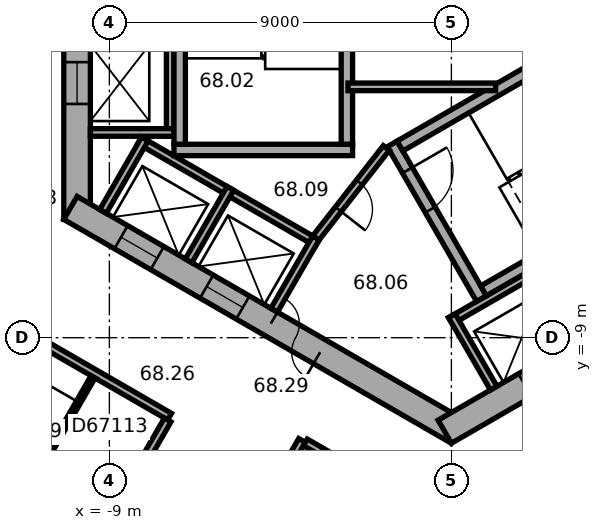
"""IFC4 building model, lengths in metres.
Left out: names, types, materials, properties, quantities, classifications, styles, units other than length and angle.
Written with IfcOpenShell. Run it as: python <this file> out.ifc"""

import sys

from ifc_helpers import new_model, si_unit, direction, frame, frame_2d, origin, place, context, subcontext, project, spatial, rectangle, extrude, element, fill, save


model = new_model("IFC4")
c1 = context("Model", 3, precision=1e-05, world=origin(), true_north=direction((0.0, 1.0)))
c2 = subcontext(c1, "Body", "Model", "MODEL_VIEW")
j1 = project(units=[si_unit("LENGTHUNIT", "METRE"), si_unit("PLANEANGLEUNIT", "RADIAN")], contexts=[c1])
p1 = place(None, origin())
s1 = spatial("IfcSite", under=j1, at=p1, CompositionType="ELEMENT")
p2 = place(p1, origin())
s2 = spatial("IfcBuilding", under=s1, at=p2, CompositionType="ELEMENT")
p3 = place(p2, frame((0.0, 0.0, 274.6)))
s3 = spatial("IfcBuildingStorey", under=s2, at=p3, CompositionType="ELEMENT", Elevation=274.6)
p4 = place(p3, frame((-9.85, 5.889, 0.0), z_axis=(0.0, 0.0, 1.0), x_axis=(0.0, -1.0, 0.0)))
e1 = element("IfcWall", 1, at=p4, inside=s3, PredefinedType="SHEAR", context=c2, shape_type="SweptSolid", body=[
    extrude(rectangle(XDim=11.778, YDim=0.7, at=frame_2d((5.889, 0.0))), origin(), (0.0, 0.0, 1.0), 3.7),
])
p5 = place(p4, frame((5.039, 0.0, 0.0)))
e2 = element("IfcOpeningElement", 2, at=p5, cuts=e1, PredefinedType="OPENING", context=c2, shape_type="SweptSolid", body=[
    extrude(rectangle(XDim=1.1, YDim=2.1, at=frame_2d((0.55, 1.05))), frame((0.0, 0.36, 0.0), z_axis=(0.0, -1.0, 0.0), x_axis=(1.0, 0.0, 0.0)), (0.0, 0.0, 1.0), 0.72),
])
p6 = place(p4, frame((7.639, 0.0, 0.0)))
e3 = element("IfcOpeningElement", 3, at=p6, cuts=e1, PredefinedType="OPENING", context=c2, shape_type="SweptSolid", body=[
    extrude(rectangle(XDim=1.1, YDim=2.1, at=frame_2d((0.55, 1.05))), frame((0.0, 0.36, 0.0), z_axis=(0.0, -1.0, 0.0), x_axis=(1.0, 0.0, 0.0)), (0.0, 0.0, 1.0), 0.72),
])
p7 = place(p3, frame((-10.025, -5.586, 0.0), z_axis=(0.0, 0.0, 1.0), x_axis=(0.866026453023, -0.499998182661, 0.0)))
e4 = element("IfcWall", 4, at=p7, inside=s3, PredefinedType="SHEAR", context=c2, shape_type="SweptSolid", body=[
    extrude(rectangle(XDim=11.778, YDim=0.7, at=frame_2d((5.889, 0.0))), origin(), (0.0, 0.0, 1.0), 3.7),
])
p8 = place(p7, frame((6.089, 0.0, 0.0)))
e5 = element("IfcOpeningElement", 5, at=p8, cuts=e4, PredefinedType="OPENING", context=c2, shape_type="SweptSolid", body=[
    extrude(rectangle(XDim=1.5, YDim=2.1, at=frame_2d((0.75, 1.05))), frame((0.0, 0.36, 0.0), z_axis=(0.0, -1.0, 0.0), x_axis=(1.0, 0.0, 0.0)), (0.0, 0.0, 1.0), 0.72),
])
p9 = place(p7, frame((1.539, 0.0, 0.0)))
e6 = element("IfcOpeningElement", 6, at=p9, cuts=e4, PredefinedType="OPENING", context=c2, shape_type="SweptSolid", body=[
    extrude(rectangle(XDim=1.1, YDim=2.1, at=frame_2d((0.55, 1.05))), frame((0.0, 0.36, 0.0), z_axis=(0.0, -1.0, 0.0), x_axis=(1.0, 0.0, 0.0)), (0.0, 0.0, 1.0), 0.72),
])
p10 = place(p7, frame((4.139, 0.0, 0.0)))
e7 = element("IfcOpeningElement", 7, at=p10, cuts=e4, PredefinedType="OPENING", context=c2, shape_type="SweptSolid", body=[
    extrude(rectangle(XDim=1.1, YDim=2.1, at=frame_2d((0.55, 1.05))), frame((0.0, 0.36, 0.0), z_axis=(0.0, -1.0, 0.0), x_axis=(1.0, 0.0, 0.0)), (0.0, 0.0, 1.0), 0.72),
])
p11 = place(p3, frame((-0.175, -11.475, 0.0), z_axis=(0.0, 0.0, 1.0), x_axis=(0.866026453023, 0.499998182661, 0.0)))
e8 = element("IfcWall", 8, at=p11, inside=s3, PredefinedType="SHEAR", context=c2, shape_type="SweptSolid", body=[
    extrude(rectangle(XDim=11.778, YDim=0.7, at=frame_2d((5.889, 0.0))), origin(), (0.0, 0.0, 1.0), 3.7),
])
p12 = place(p11, frame((2.439, 0.0, 0.0)))
e9 = element("IfcOpeningElement", 9, at=p12, cuts=e8, PredefinedType="OPENING", context=c2, shape_type="SweptSolid", body=[
    extrude(rectangle(XDim=1.1, YDim=2.1, at=frame_2d((0.55, 1.05))), frame((0.0, 0.36, 0.0), z_axis=(0.0, -1.0, 0.0), x_axis=(1.0, 0.0, 0.0)), (0.0, 0.0, 1.0), 0.72),
])
p13 = place(p11, frame((5.039, 0.0, 0.0)))
e10 = element("IfcOpeningElement", 10, at=p13, cuts=e8, PredefinedType="OPENING", context=c2, shape_type="SweptSolid", body=[
    extrude(rectangle(XDim=1.1, YDim=2.1, at=frame_2d((0.55, 1.05))), frame((0.0, 0.36, 0.0), z_axis=(0.0, -1.0, 0.0), x_axis=(1.0, 0.0, 0.0)), (0.0, 0.0, 1.0), 0.72),
])
p14 = place(p11, frame((7.639, 0.0, 0.0)))
e11 = element("IfcOpeningElement", 11, at=p14, cuts=e8, PredefinedType="OPENING", context=c2, shape_type="SweptSolid", body=[
    extrude(rectangle(XDim=1.1, YDim=2.1, at=frame_2d((0.55, 1.05))), frame((0.0, 0.36, 0.0), z_axis=(0.0, -1.0, 0.0), x_axis=(1.0, 0.0, 0.0)), (0.0, 0.0, 1.0), 0.72),
])
p15 = place(p3, frame((-7.4, 4.3, 0.0), z_axis=(0.0, 0.0, 1.0), x_axis=(0.0, -1.0, 0.0)))
e12 = element("IfcWall", 12, at=p15, inside=s3, PredefinedType="PARTITIONING", context=c2, shape_type="SweptSolid", body=[
    extrude(rectangle(XDim=8.0, YDim=0.2, at=frame_2d((4.0, 0.0))), origin(), (0.0, 0.0, 1.0), 3.35),
])
p16 = place(p3, frame((-7.3, -3.6, 0.0), z_axis=(0.0, 0.0, 1.0), x_axis=(-1.0, 0.0, 0.0)))
e13 = element("IfcWall", 13, at=p16, inside=s3, PredefinedType="PARTITIONING", context=c2, shape_type="SweptSolid", body=[
    extrude(rectangle(XDim=2.2, YDim=0.2, at=frame_2d((1.1, 0.0))), origin(), (0.0, 0.0, 1.0), 3.35),
])
p17 = place(p3, frame((-8.203, -3.809, 0.0), z_axis=(0.0, 0.0, 1.0), x_axis=(0.866028230842, -0.499995103361, 0.0)))
e14 = element("IfcWall", 14, at=p17, inside=s3, PredefinedType="PARTITIONING", context=c2, shape_type="SweptSolid", body=[
    extrude(rectangle(XDim=5.4, YDim=0.2, at=frame_2d((2.7, 0.0))), origin(), (0.0, 0.0, 1.0), 3.35),
])
for number, where, z_axis, x_axis in (
    (15, (-8.067, -3.772, 0.0), (0.0, 0.0, 1.0), (-0.5, -0.866, 0.0)),
    (16, (-5.815, -5.072, 0.0), (0.0, 0.0, 1.0), (-0.5, -0.866, 0.0)),
):
    element("IfcWall", number, at=place(p3, frame(where, z_axis=z_axis, x_axis=x_axis)), inside=s3, PredefinedType="PARTITIONING", context=c2, shape_type="SweptSolid", body=[
        extrude(rectangle(XDim=2.2, YDim=0.2, at=frame_2d((1.1, 0.0))), origin(), (0.0, 0.0, 1.0), 3.35),
    ])
p18 = place(p3, frame((-3.563, -6.372, 0.0), z_axis=(0.0, 0.0, 1.0), x_axis=(-0.499994660107, -0.866028486751, 0.0)))
e17 = element("IfcWall", 17, at=p18, inside=s3, PredefinedType="PARTITIONING", context=c2, shape_type="SweptSolid", body=[
    extrude(rectangle(XDim=2.2, YDim=0.2, at=frame_2d((1.1, 0.0))), origin(), (0.0, 0.0, 1.0), 3.35),
])
p19 = place(p3, frame((-0.024, -8.559, 0.0), z_axis=(0.0, 0.0, 1.0), x_axis=(0.866026010844, 0.49999894854, 0.0)))
e18 = element("IfcWall", 18, at=p19, inside=s3, PredefinedType="PARTITIONING", context=c2, shape_type="SweptSolid", body=[
    extrude(rectangle(XDim=8.0, YDim=0.2, at=frame_2d((4.0, 0.0))), origin(), (0.0, 0.0, 1.0), 3.35),
])
p20 = place(p3, frame((0.013, -8.422, 0.0), z_axis=(0.0, 0.0, 1.0), x_axis=(0.500077893725, -0.86598042715, 0.0)))
e19 = element("IfcWall", 19, at=p20, inside=s3, PredefinedType="PARTITIONING", context=c2, shape_type="SweptSolid", body=[
    extrude(rectangle(XDim=2.2, YDim=0.2, at=frame_2d((1.1, 0.0))), origin(), (0.0, 0.0, 1.0), 3.35),
])
p21 = place(p3, frame((-2.6, -4.06, 0.0), z_axis=(0.0, 0.0, 1.0), x_axis=(-1.0, 0.0, 0.0)))
e20 = element("IfcWall", 20, at=p21, inside=s3, PredefinedType="SHEAR", context=c2, shape_type="SweptSolid", body=[
    extrude(rectangle(XDim=4.7, YDim=0.3, at=frame_2d((2.35, 0.0))), origin(), (0.0, 0.0, 1.0), 3.35),
])
for number, where, z_axis, x_axis in (
    (21, (-2.75, 3.15, 0.0), (0.0, 0.0, 1.0), (0.0, -1.0, 0.0)),
    (22, (-7.15, 3.15, 0.0), (0.0, 0.0, 1.0), (0.0, -1.0, 0.0)),
):
    element("IfcWall", number, at=place(p3, frame(where, z_axis=z_axis, x_axis=x_axis)), inside=s3, PredefinedType="SHEAR", context=c2, shape_type="SweptSolid", body=[
        extrude(rectangle(XDim=7.06, YDim=0.3, at=frame_2d((3.53, 0.0))), origin(), (0.0, 0.0, 1.0), 3.35),
    ])
p22 = place(p3, frame((-1.558, -3.902, 0.0), z_axis=(0.0, 0.0, 1.0), x_axis=(0.499977259774, -0.866038532462, 0.0)))
e23 = element("IfcWall", 23, at=p22, inside=s3, PredefinedType="SHEAR", context=c2, shape_type="SweptSolid", body=[
    extrude(rectangle(XDim=4.7, YDim=0.3, at=frame_2d((2.35, 0.0))), origin(), (0.0, 0.0, 1.0), 3.35),
])
p23 = place(p22, frame((0.8, 0.0, 0.0)))
e24 = element("IfcOpeningElement", 24, at=p23, cuts=e23, PredefinedType="OPENING", context=c2, shape_type="SweptSolid", body=[
    extrude(rectangle(XDim=1.2, YDim=2.1, at=frame_2d((0.6, 1.05))), frame((0.0, 0.16, 0.0), z_axis=(0.0, -1.0, 0.0), x_axis=(1.0, 0.0, 0.0)), (0.0, 0.0, 1.0), 0.32),
])
for number, where, z_axis, x_axis in (
    (25, (-1.353, -3.957, 0.0), (0.0, 0.0, 1.0), (0.866, 0.5, 0.0)),
    (26, (0.847, -7.767, 0.0), (0.0, 0.0, 1.0), (0.866, 0.5, 0.0)),
):
    element("IfcWall", number, at=place(p3, frame(where, z_axis=z_axis, x_axis=x_axis)), inside=s3, PredefinedType="SHEAR", context=c2, shape_type="SweptSolid", body=[
        extrude(rectangle(XDim=7.06, YDim=0.3, at=frame_2d((3.53, 0.0))), origin(), (0.0, 0.0, 1.0), 3.35),
    ])
p24 = place(p3, frame((-1.712, -4.008, 0.0), z_axis=(0.0, 0.0, 1.0), x_axis=(-0.616549420702, -0.787316208287, 0.0)))
e27 = element("IfcWall", 27, at=p24, inside=s3, PredefinedType="PARTITIONING", context=c2, shape_type="SweptSolid", body=[
    extrude(rectangle(XDim=3.002, YDim=0.2, at=frame_2d((1.501, 0.0))), origin(), (0.0, 0.0, 1.0), 3.35),
])
p25 = place(p24, frame((1.15, 0.0, 0.0)))
e28 = element("IfcOpeningElement", 28, at=p25, cuts=e27, PredefinedType="OPENING", context=c2, shape_type="SweptSolid", body=[
    extrude(rectangle(XDim=0.9, YDim=2.1, at=frame_2d((0.45, 1.05))), frame((0.0, 0.11, 0.0), z_axis=(0.0, -1.0, 0.0), x_axis=(1.0, 0.0, 0.0)), (0.0, 0.0, 1.0), 0.22),
])
p26 = place(p3, frame((-2.72, -2.4, 0.0), z_axis=(0.0, 0.0, 1.0), x_axis=(1.0, 0.0, 0.0)))
e29 = element("IfcWall", 29, at=p26, inside=s3, PredefinedType="PARTITIONING", context=c2, shape_type="SweptSolid", body=[
    extrude(rectangle(XDim=3.883, YDim=0.2, at=frame_2d((1.941, 0.0))), origin(), (0.0, 0.0, 1.0), 3.35),
])
p27 = place(p3, frame((-11.285, -8.844, 0.0), z_axis=(0.0, 0.0, 1.0), x_axis=(0.866021785011, -0.500006267848, 0.0)))
e30 = element("IfcWall", 30, at=p27, inside=s3, PredefinedType="PARTITIONING", context=c2, shape_type="SweptSolid", body=[
    extrude(rectangle(XDim=4.468, YDim=0.2, at=frame_2d((2.234, 0.0))), origin(), (0.0, 0.0, 1.0), 3.35),
])
p28 = place(p3, frame((-9.99, -15.537, 0.0), z_axis=(0.0, 0.0, 1.0), x_axis=(0.499966611936, 0.866044679534, 0.0)))
e31 = element("IfcWall", 31, at=p28, inside=s3, PredefinedType="PARTITIONING", context=c2, shape_type="SweptSolid", body=[
    extrude(rectangle(XDim=5.049, YDim=0.2, at=frame_2d((2.524, 0.0))), origin(), (0.0, 0.0, 1.0), 2.65),
])
p29 = place(p28, frame((2.024, 0.0, 0.0)))
e32 = element("IfcOpeningElement", 32, at=p29, cuts=e31, PredefinedType="OPENING", context=c2, shape_type="SweptSolid", body=[
    extrude(rectangle(XDim=1.0, YDim=2.1, at=frame_2d((0.5, 1.05))), frame((0.0, 0.11, 0.0), z_axis=(0.0, -1.0, 0.0), x_axis=(1.0, 0.0, 0.0)), (0.0, 0.0, 1.0), 0.22),
])
p30 = place(p3, frame((-9.429, -10.03, 0.0), z_axis=(0.0, 0.0, 1.0), x_axis=(-0.500034220881, -0.866005645448, 0.0)))
e33 = element("IfcWall", 33, at=p30, inside=s3, PredefinedType="PARTITIONING", context=c2, shape_type="SweptSolid", body=[
    extrude(rectangle(XDim=2.44, YDim=0.12, at=frame_2d((1.22, 0.0))), origin(), (0.0, 0.0, 1.0), 3.35),
])
p31 = place(p30, frame((0.77, 0.0, 0.0)))
e34 = element("IfcOpeningElement", 34, at=p31, cuts=e33, PredefinedType="OPENING", context=c2, shape_type="SweptSolid", body=[
    extrude(rectangle(XDim=0.9, YDim=2.1, at=frame_2d((0.45, 1.05))), frame((0.0, 0.07, 0.0), z_axis=(0.0, -1.0, 0.0), x_axis=(1.0, 0.0, 0.0)), (0.0, 0.0, 1.0), 0.14),
])
p32 = place(p3, frame((-7.105, -17.202, 0.0), z_axis=(0.0, 0.0, 1.0), x_axis=(0.499988692146, 0.866031932279, 0.0)))
e35 = element("IfcWall", 35, at=p32, inside=s3, PredefinedType="PARTITIONING", context=c2, shape_type="SweptSolid", body=[
    extrude(rectangle(XDim=6.35, YDim=0.2, at=frame_2d((3.175, 0.0))), origin(), (0.0, 0.0, 1.0), 3.35),
])
p33 = place(p32, frame((2.675, 0.0, 0.0)))
e36 = element("IfcOpeningElement", 36, at=p33, cuts=e35, PredefinedType="OPENING", context=c2, shape_type="SweptSolid", body=[
    extrude(rectangle(XDim=1.0, YDim=2.1, at=frame_2d((0.5, 1.05))), frame((0.0, 0.11, 0.0), z_axis=(0.0, -1.0, 0.0), x_axis=(1.0, 0.0, 0.0)), (0.0, 0.0, 1.0), 0.22),
])
p34 = place(p3, frame((-3.843, -11.753, 0.0), z_axis=(0.0, 0.0, 1.0), x_axis=(0.866031037473, -0.499990242038, 0.0)))
e37 = element("IfcWall", 37, at=p34, inside=s3, PredefinedType="PARTITIONING", context=c2, shape_type="SweptSolid", body=[
    extrude(rectangle(XDim=3.341, YDim=0.2, at=frame_2d((1.67, 0.0))), origin(), (0.0, 0.0, 1.0), 3.35),
])
p35 = place(p8, origin())
e38 = element("IfcDoor", 38, at=p35, inside=s3, OperationType="DOUBLE_DOOR_SINGLE_SWING", PredefinedType="DOOR", context=c2, shape_type="SweptSolid", body=[
    extrude(rectangle(XDim=1.5, YDim=2.1, at=frame_2d((0.75, 1.05))), frame((0.0, 0.025, 0.0), z_axis=(0.0, -1.0, 0.0), x_axis=(1.0, 0.0, 0.0)), (0.0, 0.0, 1.0), 0.05),
])
fill(e5, e38)
p36 = place(p23, origin())
e39 = element("IfcDoor", 39, at=p36, inside=s3, OperationType="SINGLE_SWING_RIGHT", PredefinedType="DOOR", context=c2, shape_type="SweptSolid", body=[
    extrude(rectangle(XDim=1.2, YDim=2.1, at=frame_2d((0.6, 1.05))), frame((0.0, 0.025, 0.0), z_axis=(0.0, -1.0, 0.0), x_axis=(1.0, 0.0, 0.0)), (0.0, 0.0, 1.0), 0.05),
])
fill(e24, e39)
p37 = place(p25, origin())
e40 = element("IfcDoor", 40, at=p37, inside=s3, OperationType="SINGLE_SWING_LEFT", PredefinedType="DOOR", context=c2, shape_type="SweptSolid", body=[
    extrude(rectangle(XDim=0.9, YDim=2.1, at=frame_2d((0.45, 1.05))), frame((0.0, 0.025, 0.0), z_axis=(0.0, -1.0, 0.0), x_axis=(1.0, 0.0, 0.0)), (0.0, 0.0, 1.0), 0.05),
])
fill(e28, e40)
p38 = place(p6, origin())
e41 = element("IfcDoor", 41, at=p38, inside=s3, OperationType="DOUBLE_DOOR_SLIDING", PredefinedType="DOOR", context=c2, shape_type="SweptSolid", body=[
    extrude(rectangle(XDim=1.1, YDim=2.1, at=frame_2d((0.55, 1.05))), frame((0.0, 0.025, 0.0), z_axis=(0.0, -1.0, 0.0), x_axis=(1.0, 0.0, 0.0)), (0.0, 0.0, 1.0), 0.05),
])
fill(e3, e41)
p39 = place(p9, origin())
e42 = element("IfcDoor", 42, at=p39, inside=s3, OperationType="DOUBLE_DOOR_SLIDING", PredefinedType="DOOR", context=c2, shape_type="SweptSolid", body=[
    extrude(rectangle(XDim=1.1, YDim=2.1, at=frame_2d((0.55, 1.05))), frame((0.0, 0.025, 0.0), z_axis=(0.0, -1.0, 0.0), x_axis=(1.0, 0.0, 0.0)), (0.0, 0.0, 1.0), 0.05),
])
fill(e6, e42)
p40 = place(p10, origin())
e43 = element("IfcDoor", 43, at=p40, inside=s3, OperationType="DOUBLE_DOOR_SLIDING", PredefinedType="DOOR", context=c2, shape_type="SweptSolid", body=[
    extrude(rectangle(XDim=1.1, YDim=2.1, at=frame_2d((0.55, 1.05))), frame((0.0, 0.025, 0.0), z_axis=(0.0, -1.0, 0.0), x_axis=(1.0, 0.0, 0.0)), (0.0, 0.0, 1.0), 0.05),
])
fill(e7, e43)
p41 = place(p31, origin())
e44 = element("IfcDoor", 44, at=p41, inside=s3, OperationType="SINGLE_SWING_LEFT", PredefinedType="DOOR", context=c2, shape_type="SweptSolid", body=[
    extrude(rectangle(XDim=0.9, YDim=2.1, at=frame_2d((0.45, 1.05))), frame((0.0, 0.025, 0.0), z_axis=(0.0, -1.0, 0.0), x_axis=(1.0, 0.0, 0.0)), (0.0, 0.0, 1.0), 0.05),
])
fill(e34, e44)
save(model, sys.argv[1])
